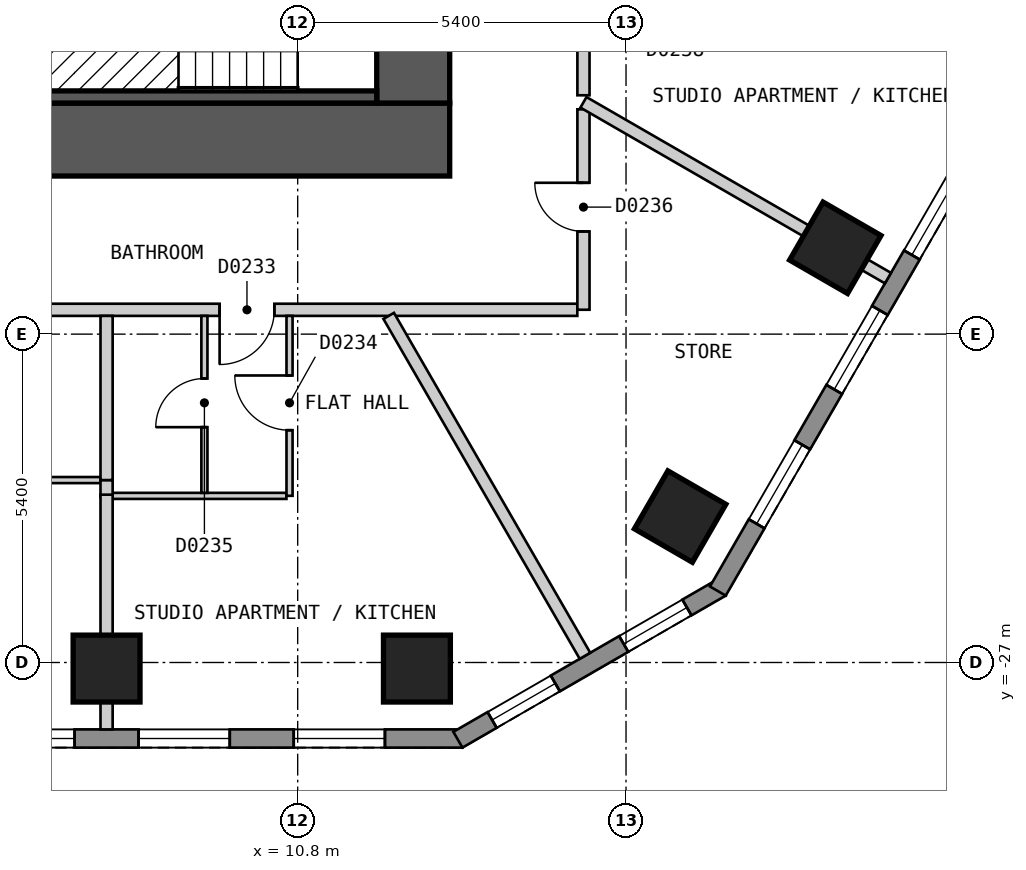
"""IFC4 building model, lengths in metres.
Left out: names, types, materials, properties, quantities, classifications, styles, units other than length and angle.
Written with IfcOpenShell. Run it as: python <this file> out.ifc"""

import sys

from ifc_helpers import new_model, si_unit, direction, frame, frame_2d, origin, origin_2d, place, context, subcontext, project, spatial, polyline, rectangle, outline, extrude, element, fill, save


model = new_model("IFC4")
c1 = context("Model", 3, precision=1e-05, world=origin(), true_north=direction((0.0, 1.0)))
c2 = subcontext(c1, "Body", "Model", "MODEL_VIEW")
j1 = project(units=[si_unit("LENGTHUNIT", "METRE"), si_unit("PLANEANGLEUNIT", "RADIAN")], contexts=[c1])
p1 = place(None, origin())
s1 = spatial("IfcSite", under=j1, at=p1, CompositionType="ELEMENT")
p2 = place(p1, origin())
s2 = spatial("IfcBuilding", under=s1, at=p2, CompositionType="ELEMENT")
p3 = place(p2, frame((0.0, 0.0, 47.4)))
s3 = spatial("IfcBuildingStorey", under=s2, at=p3, CompositionType="ELEMENT", Elevation=47.4)
for number, where, z_axis, x_axis in (
    (1, (7.657, -27.1, 0.0), (0.0, 0.0, 1.0), (1.0, 0.0, 0.0)),
    (2, (12.761, -27.1, 0.0), (0.0, 0.0, 1.0), (1.0, 0.0, 0.0)),
    (3, (17.09, -24.6, 0.0), (0.0, 0.0, 1.0), (0.5, 0.866, 0.0)),
    (4, (19.642, -20.18, 0.0), (0.0, 0.0, 1.0), (0.5, 0.866, 0.0)),
):
    element("IfcColumn", number, at=place(p3, frame(where, z_axis=z_axis, x_axis=x_axis)), inside=s3, PredefinedType="COLUMN", context=c2, shape_type="SweptSolid", body=[
        extrude(rectangle(XDim=1.1, YDim=1.1, at=origin_2d()), origin(), (0.0, 0.0, 1.0), 3.0),
    ])
p4 = place(p3, frame((-13.3, -18.4, 0.0), z_axis=(0.0, 0.0, 1.0), x_axis=(1.0, 0.0, 0.0)))
e5 = element("IfcWall", 5, at=p4, inside=s3, PredefinedType="SHEAR", context=c2, shape_type="SweptSolid", body=[
    extrude(rectangle(XDim=26.6, YDim=1.2, at=frame_2d((13.3, 0.0))), origin(), (0.0, 0.0, 1.0), 2.7),
])
p5 = place(p3, frame((12.7, -17.8, 0.0), z_axis=(0.0, 0.0, 1.0), x_axis=(0.0, 1.0, 0.0)))
e6 = element("IfcWall", 6, at=p5, inside=s3, PredefinedType="SHEAR", context=c2, shape_type="SweptSolid", body=[
    extrude(rectangle(XDim=11.6, YDim=1.2, at=frame_2d((5.8, 0.0))), origin(), (0.0, 0.0, 1.0), 2.7),
])
p6 = place(p3, frame((-13.51, -28.25, 0.0), z_axis=(0.0, 0.0, 1.0), x_axis=(1.0, 0.0, 0.0)))
e7 = element("IfcWall", 7, at=p6, inside=s3, PredefinedType="SOLIDWALL", context=c2, shape_type="SweptSolid", body=[
    extrude(outline(polyline([(0.0, -0.15), (27.02, -0.15), (26.94, 0.15), (0.08, 0.15), (0.0, -0.15)])), origin(), (0.0, 0.0, 1.0), 2.7),
])
p7 = place(p6, frame((1.277, 0.0, 0.15)))
e8 = element("IfcOpeningElement", 8, at=p7, cuts=e7, PredefinedType="OPENING", context=c2, shape_type="SweptSolid", body=[
    extrude(rectangle(XDim=1.5, YDim=2.1, at=frame_2d((0.75, 1.05))), frame((0.0, 0.16, 0.0), z_axis=(0.0, -1.0, 0.0), x_axis=(1.0, 0.0, 0.0)), (0.0, 0.0, 1.0), 0.32),
])
p8 = place(p6, frame((3.829, 0.0, 0.15)))
e9 = element("IfcOpeningElement", 9, at=p8, cuts=e7, PredefinedType="OPENING", context=c2, shape_type="SweptSolid", body=[
    extrude(rectangle(XDim=1.5, YDim=2.1, at=frame_2d((0.75, 1.05))), frame((0.0, 0.16, 0.0), z_axis=(0.0, -1.0, 0.0), x_axis=(1.0, 0.0, 0.0)), (0.0, 0.0, 1.0), 0.32),
])
p9 = place(p6, frame((6.381, 0.0, 0.15)))
e10 = element("IfcOpeningElement", 10, at=p9, cuts=e7, PredefinedType="OPENING", context=c2, shape_type="SweptSolid", body=[
    extrude(rectangle(XDim=1.5, YDim=2.1, at=frame_2d((0.75, 1.05))), frame((0.0, 0.16, 0.0), z_axis=(0.0, -1.0, 0.0), x_axis=(1.0, 0.0, 0.0)), (0.0, 0.0, 1.0), 0.32),
])
p10 = place(p6, frame((8.933, 0.0, 0.15)))
e11 = element("IfcOpeningElement", 11, at=p10, cuts=e7, PredefinedType="OPENING", context=c2, shape_type="SweptSolid", body=[
    extrude(rectangle(XDim=1.5, YDim=2.1, at=frame_2d((0.75, 1.05))), frame((0.0, 0.16, 0.0), z_axis=(0.0, -1.0, 0.0), x_axis=(1.0, 0.0, 0.0)), (0.0, 0.0, 1.0), 0.32),
])
p11 = place(p6, frame((11.485, 0.0, 0.15)))
e12 = element("IfcOpeningElement", 12, at=p11, cuts=e7, PredefinedType="OPENING", context=c2, shape_type="SweptSolid", body=[
    extrude(rectangle(XDim=1.5, YDim=2.1, at=frame_2d((0.75, 1.05))), frame((0.0, 0.16, 0.0), z_axis=(0.0, -1.0, 0.0), x_axis=(1.0, 0.0, 0.0)), (0.0, 0.0, 1.0), 0.32),
])
p12 = place(p6, frame((14.037, 0.0, 0.15)))
e13 = element("IfcOpeningElement", 13, at=p12, cuts=e7, PredefinedType="OPENING", context=c2, shape_type="SweptSolid", body=[
    extrude(rectangle(XDim=1.5, YDim=2.1, at=frame_2d((0.75, 1.05))), frame((0.0, 0.16, 0.0), z_axis=(0.0, -1.0, 0.0), x_axis=(1.0, 0.0, 0.0)), (0.0, 0.0, 1.0), 0.32),
])
p13 = place(p6, frame((16.589, 0.0, 0.15)))
e14 = element("IfcOpeningElement", 14, at=p13, cuts=e7, PredefinedType="OPENING", context=c2, shape_type="SweptSolid", body=[
    extrude(rectangle(XDim=1.5, YDim=2.1, at=frame_2d((0.75, 1.05))), frame((0.0, 0.16, 0.0), z_axis=(0.0, -1.0, 0.0), x_axis=(1.0, 0.0, 0.0)), (0.0, 0.0, 1.0), 0.32),
])
p14 = place(p6, frame((19.141, 0.0, 0.15)))
e15 = element("IfcOpeningElement", 15, at=p14, cuts=e7, PredefinedType="OPENING", context=c2, shape_type="SweptSolid", body=[
    extrude(rectangle(XDim=1.5, YDim=2.1, at=frame_2d((0.75, 1.05))), frame((0.0, 0.16, 0.0), z_axis=(0.0, -1.0, 0.0), x_axis=(1.0, 0.0, 0.0)), (0.0, 0.0, 1.0), 0.32),
])
p15 = place(p6, frame((21.693, 0.0, 0.15)))
e16 = element("IfcOpeningElement", 16, at=p15, cuts=e7, PredefinedType="OPENING", context=c2, shape_type="SweptSolid", body=[
    extrude(rectangle(XDim=1.5, YDim=2.1, at=frame_2d((0.75, 1.05))), frame((0.0, 0.16, 0.0), z_axis=(0.0, -1.0, 0.0), x_axis=(1.0, 0.0, 0.0)), (0.0, 0.0, 1.0), 0.32),
])
p16 = place(p6, frame((24.245, 0.0, 0.15)))
e17 = element("IfcOpeningElement", 17, at=p16, cuts=e7, PredefinedType="OPENING", context=c2, shape_type="SweptSolid", body=[
    extrude(rectangle(XDim=1.5, YDim=2.1, at=frame_2d((0.75, 1.05))), frame((0.0, 0.16, 0.0), z_axis=(0.0, -1.0, 0.0), x_axis=(1.0, 0.0, 0.0)), (0.0, 0.0, 1.0), 0.32),
])
p17 = place(p3, frame((13.435, -28.27, 0.0), z_axis=(0.0, 0.0, 1.0), x_axis=(0.866010750942, 0.50002537861, 0.0)))
e18 = element("IfcWall", 18, at=p17, inside=s3, PredefinedType="SOLIDWALL", context=c2, shape_type="SweptSolid", body=[
    extrude(outline(polyline([(0.0, -0.15), (5.0, -0.15), (4.919, 0.15), (0.08, 0.15), (0.0, -0.15)])), origin(), (0.0, 0.0, 1.0), 2.7),
])
p18 = place(p17, frame((0.65, 0.0, 0.15)))
e19 = element("IfcOpeningElement", 19, at=p18, cuts=e18, PredefinedType="OPENING", context=c2, shape_type="SweptSolid", body=[
    extrude(rectangle(XDim=1.2, YDim=2.1, at=frame_2d((0.6, 1.05))), frame((0.0, 0.16, 0.0), z_axis=(0.0, -1.0, 0.0), x_axis=(1.0, 0.0, 0.0)), (0.0, 0.0, 1.0), 0.32),
])
p19 = place(p17, frame((3.149, 0.0, 0.15)))
e20 = element("IfcOpeningElement", 20, at=p19, cuts=e18, PredefinedType="OPENING", context=c2, shape_type="SweptSolid", body=[
    extrude(rectangle(XDim=1.2, YDim=2.1, at=frame_2d((0.6, 1.05))), frame((0.0, 0.16, 0.0), z_axis=(0.0, -1.0, 0.0), x_axis=(1.0, 0.0, 0.0)), (0.0, 0.0, 1.0), 0.32),
])
p20 = place(p3, frame((17.71, -25.825, 0.0), z_axis=(0.0, 0.0, 1.0), x_axis=(0.500001938803, 0.866024284413, 0.0)))
e21 = element("IfcWall", 21, at=p20, inside=s3, PredefinedType="SOLIDWALL", context=c2, shape_type="SweptSolid", body=[
    extrude(outline(polyline([(0.0, -0.15), (27.02, -0.15), (26.94, 0.15), (0.08, 0.15), (0.0, -0.15)])), origin(), (0.0, 0.0, 1.0), 2.7),
])
p21 = place(p20, frame((1.277, 0.0, 0.15)))
e22 = element("IfcOpeningElement", 22, at=p21, cuts=e21, PredefinedType="OPENING", context=c2, shape_type="SweptSolid", body=[
    extrude(rectangle(XDim=1.5, YDim=2.1, at=frame_2d((0.75, 1.05))), frame((0.0, 0.16, 0.0), z_axis=(0.0, -1.0, 0.0), x_axis=(1.0, 0.0, 0.0)), (0.0, 0.0, 1.0), 0.32),
])
p22 = place(p20, frame((3.829, 0.0, 0.15)))
e23 = element("IfcOpeningElement", 23, at=p22, cuts=e21, PredefinedType="OPENING", context=c2, shape_type="SweptSolid", body=[
    extrude(rectangle(XDim=1.5, YDim=2.1, at=frame_2d((0.75, 1.05))), frame((0.0, 0.16, 0.0), z_axis=(0.0, -1.0, 0.0), x_axis=(1.0, 0.0, 0.0)), (0.0, 0.0, 1.0), 0.32),
])
p23 = place(p20, frame((6.382, 0.0, 0.15)))
e24 = element("IfcOpeningElement", 24, at=p23, cuts=e21, PredefinedType="OPENING", context=c2, shape_type="SweptSolid", body=[
    extrude(rectangle(XDim=1.5, YDim=2.1, at=frame_2d((0.75, 1.05))), frame((0.0, 0.16, 0.0), z_axis=(0.0, -1.0, 0.0), x_axis=(1.0, 0.0, 0.0)), (0.0, 0.0, 1.0), 0.32),
])
p24 = place(p20, frame((8.933, 0.0, 0.15)))
e25 = element("IfcOpeningElement", 25, at=p24, cuts=e21, PredefinedType="OPENING", context=c2, shape_type="SweptSolid", body=[
    extrude(rectangle(XDim=1.5, YDim=2.1, at=frame_2d((0.75, 1.05))), frame((0.0, 0.16, 0.0), z_axis=(0.0, -1.0, 0.0), x_axis=(1.0, 0.0, 0.0)), (0.0, 0.0, 1.0), 0.32),
])
p25 = place(p20, frame((11.485, 0.0, 0.15)))
e26 = element("IfcOpeningElement", 26, at=p25, cuts=e21, PredefinedType="OPENING", context=c2, shape_type="SweptSolid", body=[
    extrude(rectangle(XDim=1.5, YDim=2.1, at=frame_2d((0.75, 1.05))), frame((0.0, 0.16, 0.0), z_axis=(0.0, -1.0, 0.0), x_axis=(1.0, 0.0, 0.0)), (0.0, 0.0, 1.0), 0.32),
])
p26 = place(p20, frame((14.037, 0.0, 0.15)))
e27 = element("IfcOpeningElement", 27, at=p26, cuts=e21, PredefinedType="OPENING", context=c2, shape_type="SweptSolid", body=[
    extrude(rectangle(XDim=1.5, YDim=2.1, at=frame_2d((0.75, 1.05))), frame((0.0, 0.16, 0.0), z_axis=(0.0, -1.0, 0.0), x_axis=(1.0, 0.0, 0.0)), (0.0, 0.0, 1.0), 0.32),
])
p27 = place(p20, frame((16.589, 0.0, 0.15)))
e28 = element("IfcOpeningElement", 28, at=p27, cuts=e21, PredefinedType="OPENING", context=c2, shape_type="SweptSolid", body=[
    extrude(rectangle(XDim=1.5, YDim=2.1, at=frame_2d((0.75, 1.05))), frame((0.0, 0.16, 0.0), z_axis=(0.0, -1.0, 0.0), x_axis=(1.0, 0.0, 0.0)), (0.0, 0.0, 1.0), 0.32),
])
p28 = place(p20, frame((19.141, 0.0, 0.15)))
e29 = element("IfcOpeningElement", 29, at=p28, cuts=e21, PredefinedType="OPENING", context=c2, shape_type="SweptSolid", body=[
    extrude(rectangle(XDim=1.5, YDim=2.1, at=frame_2d((0.75, 1.05))), frame((0.0, 0.16, 0.0), z_axis=(0.0, -1.0, 0.0), x_axis=(1.0, 0.0, 0.0)), (0.0, 0.0, 1.0), 0.32),
])
p29 = place(p20, frame((21.693, 0.0, 0.15)))
e30 = element("IfcOpeningElement", 30, at=p29, cuts=e21, PredefinedType="OPENING", context=c2, shape_type="SweptSolid", body=[
    extrude(rectangle(XDim=1.5, YDim=2.1, at=frame_2d((0.75, 1.05))), frame((0.0, 0.16, 0.0), z_axis=(0.0, -1.0, 0.0), x_axis=(1.0, 0.0, 0.0)), (0.0, 0.0, 1.0), 0.32),
])
p30 = place(p20, frame((24.244, 0.0, 0.15)))
e31 = element("IfcOpeningElement", 31, at=p30, cuts=e21, PredefinedType="OPENING", context=c2, shape_type="SweptSolid", body=[
    extrude(rectangle(XDim=1.5, YDim=2.1, at=frame_2d((0.75, 1.05))), frame((0.0, 0.16, 0.0), z_axis=(0.0, -1.0, 0.0), x_axis=(1.0, 0.0, 0.0)), (0.0, 0.0, 1.0), 0.32),
])
p31 = place(p3, frame((15.5, -15.943, 0.0), z_axis=(0.0, 0.0, 1.0), x_axis=(0.0, -1.0, 0.0)))
e32 = element("IfcWall", 32, at=p31, inside=s3, PredefinedType="PARTITIONING", context=c2, shape_type="SweptSolid", body=[
    extrude(rectangle(XDim=1.729, YDim=0.2, at=frame_2d((0.865, 0.0))), origin(), (0.0, 0.0, 1.0), 2.7),
])
p32 = place(p3, frame((-15.499, -21.2, 0.0), z_axis=(0.0, 0.0, 1.0), x_axis=(1.0, 0.0, 0.0)))
e33 = element("IfcWall", 33, at=p32, inside=s3, PredefinedType="PARTITIONING", context=c2, shape_type="SweptSolid", body=[
    extrude(rectangle(XDim=30.898, YDim=0.2, at=frame_2d((15.449, 0.0))), origin(), (0.0, 0.0, 1.0), 2.7),
])
p33 = place(p32, frame((5.084, 0.0, 0.0)))
e34 = element("IfcOpeningElement", 34, at=p33, cuts=e33, PredefinedType="OPENING", context=c2, shape_type="SweptSolid", body=[
    extrude(rectangle(XDim=0.9, YDim=2.1, at=frame_2d((0.45, 1.05))), frame((0.0, 0.11, 0.0), z_axis=(0.0, -1.0, 0.0), x_axis=(1.0, 0.0, 0.0)), (0.0, 0.0, 1.0), 0.22),
])
p34 = place(p32, frame((15.0, 0.0, 0.0)))
e35 = element("IfcOpeningElement", 35, at=p34, cuts=e33, PredefinedType="OPENING", context=c2, shape_type="SweptSolid", body=[
    extrude(rectangle(XDim=1.0, YDim=2.1, at=frame_2d((0.5, 1.05))), frame((0.0, 0.11, 0.0), z_axis=(0.0, -1.0, 0.0), x_axis=(1.0, 0.0, 0.0)), (0.0, 0.0, 1.0), 0.22),
])
p35 = place(p32, frame((25.015, 0.0, 0.0)))
e36 = element("IfcOpeningElement", 36, at=p35, cuts=e33, PredefinedType="OPENING", context=c2, shape_type="SweptSolid", body=[
    extrude(rectangle(XDim=0.9, YDim=2.1, at=frame_2d((0.45, 1.05))), frame((0.0, 0.11, 0.0), z_axis=(0.0, -1.0, 0.0), x_axis=(1.0, 0.0, 0.0)), (0.0, 0.0, 1.0), 0.22),
])
p36 = place(p3, frame((15.5, -21.199, 0.0), z_axis=(0.0, 0.0, 1.0), x_axis=(0.0, 1.0, 0.0)))
e37 = element("IfcWall", 37, at=p36, inside=s3, PredefinedType="PARTITIONING", context=c2, shape_type="SweptSolid", body=[
    extrude(rectangle(XDim=3.296, YDim=0.2, at=frame_2d((1.648, 0.0))), origin(), (0.0, 0.0, 1.0), 2.7),
])
p37 = place(p36, frame((1.288, 0.0, 0.0)))
e38 = element("IfcOpeningElement", 38, at=p37, cuts=e37, PredefinedType="OPENING", context=c2, shape_type="SweptSolid", body=[
    extrude(rectangle(XDim=0.8, YDim=2.1, at=frame_2d((0.4, 1.05))), frame((0.0, 0.11, 0.0), z_axis=(0.0, -1.0, 0.0), x_axis=(1.0, 0.0, 0.0)), (0.0, 0.0, 1.0), 0.22),
])
p38 = place(p3, frame((2.603, -24.0, 0.0), z_axis=(0.0, 0.0, 1.0), x_axis=(1.0, 0.0, 0.0)))
e39 = element("IfcWall", 39, at=p38, inside=s3, PredefinedType="PARTITIONING", context=c2, shape_type="SweptSolid", body=[
    extrude(rectangle(XDim=4.954, YDim=0.1, at=frame_2d((2.477, 0.0))), origin(), (0.0, 0.0, 1.0), 2.7),
])
p39 = place(p38, frame((2.102, 0.0, 0.0)))
e40 = element("IfcOpeningElement", 40, at=p39, cuts=e39, PredefinedType="OPENING", context=c2, shape_type="SweptSolid", body=[
    extrude(rectangle(XDim=0.8, YDim=2.1, at=frame_2d((0.4, 1.05))), frame((0.0, 0.06, 0.0), z_axis=(0.0, -1.0, 0.0), x_axis=(1.0, 0.0, 0.0)), (0.0, 0.0, 1.0), 0.12),
])
p40 = place(p3, frame((7.757, -24.26, 0.0), z_axis=(0.0, 0.0, 1.0), x_axis=(1.0, 0.0, 0.0)))
e41 = element("IfcWall", 41, at=p40, inside=s3, PredefinedType="PARTITIONING", context=c2, shape_type="SweptSolid", body=[
    extrude(rectangle(XDim=2.858, YDim=0.1, at=frame_2d((1.429, 0.0))), origin(), (0.0, 0.0, 1.0), 2.7),
])
p41 = place(p3, frame((9.266, -24.21, 0.0), z_axis=(0.0, 0.0, 1.0), x_axis=(0.0, 1.0, 0.0)))
e42 = element("IfcWall", 42, at=p41, inside=s3, PredefinedType="PARTITIONING", context=c2, shape_type="SweptSolid", body=[
    extrude(rectangle(XDim=2.91, YDim=0.1, at=frame_2d((1.455, 0.0))), origin(), (0.0, 0.0, 1.0), 2.7),
])
p42 = place(p41, frame((1.08, 0.0, 0.0)))
e43 = element("IfcOpeningElement", 43, at=p42, cuts=e42, PredefinedType="OPENING", context=c2, shape_type="SweptSolid", body=[
    extrude(rectangle(XDim=0.8, YDim=2.1, at=frame_2d((0.4, 1.05))), frame((0.0, 0.06, 0.0), z_axis=(0.0, -1.0, 0.0), x_axis=(1.0, 0.0, 0.0)), (0.0, 0.0, 1.0), 0.12),
])
p43 = place(p3, frame((10.666, -24.259, 0.0), z_axis=(0.0, 0.0, 1.0), x_axis=(0.0, 1.0, 0.0)))
e44 = element("IfcWall", 44, at=p43, inside=s3, PredefinedType="PARTITIONING", context=c2, shape_type="SweptSolid", body=[
    extrude(rectangle(XDim=2.959, YDim=0.1, at=frame_2d((1.479, 0.0))), origin(), (0.0, 0.0, 1.0), 2.7),
])
p44 = place(p43, frame((1.079, 0.0, 0.0)))
e45 = element("IfcOpeningElement", 45, at=p44, cuts=e44, PredefinedType="OPENING", context=c2, shape_type="SweptSolid", body=[
    extrude(rectangle(XDim=0.9, YDim=2.1, at=frame_2d((0.45, 1.05))), frame((0.0, 0.06, 0.0), z_axis=(0.0, -1.0, 0.0), x_axis=(1.0, 0.0, 0.0)), (0.0, 0.0, 1.0), 0.12),
])
p45 = place(p3, frame((12.297, -21.3, 0.0), z_axis=(0.0, 0.0, 1.0), x_axis=(0.500056399578, -0.865992839024, 0.0)))
e46 = element("IfcWall", 46, at=p45, inside=s3, PredefinedType="PARTITIONING", context=c2, shape_type="SweptSolid", body=[
    extrude(rectangle(XDim=6.455, YDim=0.2, at=frame_2d((3.228, 0.0))), origin(), (0.0, 0.0, 1.0), 2.7),
])
p46 = place(p3, frame((7.657, -24.0, 0.0), z_axis=(0.0, 0.0, 1.0), x_axis=(0.0, -1.0, 0.0)))
e47 = element("IfcWall", 47, at=p46, inside=s3, PredefinedType="PARTITIONING", context=c2, shape_type="SweptSolid", body=[
    extrude(rectangle(XDim=0.28, YDim=0.2, at=frame_2d((0.14, 0.0))), origin(), (0.0, 0.0, 1.0), 2.7),
])
p47 = place(p3, frame((15.5, -17.788, 0.0), z_axis=(0.0, 0.0, 1.0), x_axis=(0.866065366639, -0.499930775916, 0.0)))
e48 = element("IfcWall", 48, at=p47, inside=s3, PredefinedType="PARTITIONING", context=c2, shape_type="SweptSolid", body=[
    extrude(rectangle(XDim=5.782, YDim=0.2, at=frame_2d((2.891, 0.0))), origin(), (0.0, 0.0, 1.0), 2.7),
])
p48 = place(p3, frame((7.657, -28.1, 0.0), z_axis=(0.0, 0.0, 1.0), x_axis=(0.0, 1.0, 0.0)))
e49 = element("IfcWall", 49, at=p48, inside=s3, PredefinedType="PARTITIONING", context=c2, shape_type="SweptSolid", body=[
    extrude(rectangle(XDim=3.86, YDim=0.2, at=frame_2d((1.93, 0.0))), origin(), (0.0, 0.0, 1.0), 2.7),
])
p49 = place(p3, frame((7.657, -24.0, 0.0), z_axis=(0.0, 0.0, 1.0), x_axis=(0.0, 1.0, 0.0)))
e50 = element("IfcWall", 50, at=p49, inside=s3, PredefinedType="PARTITIONING", context=c2, shape_type="SweptSolid", body=[
    extrude(rectangle(XDim=2.7, YDim=0.2, at=frame_2d((1.35, 0.0))), origin(), (0.0, 0.0, 1.0), 2.7),
])
p50 = place(p3, frame((6.7, -17.7, 0.0), z_axis=(0.0, 0.0, 1.0), x_axis=(1.0, 0.0, 0.0)))
e51 = element("IfcWall", 51, at=p50, inside=s3, PredefinedType="SOLIDWALL", context=c2, shape_type="SweptSolid", body=[
    extrude(rectangle(XDim=5.4, YDim=0.2, at=frame_2d((2.7, 0.0))), origin(), (0.0, 0.0, 1.0), 2.7),
])
p51 = place(p14, origin())
e52 = element("IfcWindow", 52, at=p51, inside=s3, PartitioningType="SINGLE_PANEL", PredefinedType="WINDOW", context=c2, shape_type="SweptSolid", body=[
    extrude(rectangle(XDim=1.5, YDim=2.1, at=frame_2d((0.75, 1.05))), frame((0.0, 0.03, 0.0), z_axis=(0.0, -1.0, 0.0), x_axis=(1.0, 0.0, 0.0)), (0.0, 0.0, 1.0), 0.06),
])
fill(e15, e52)
p52 = place(p15, origin())
e53 = element("IfcWindow", 53, at=p52, inside=s3, PartitioningType="SINGLE_PANEL", PredefinedType="WINDOW", context=c2, shape_type="SweptSolid", body=[
    extrude(rectangle(XDim=1.5, YDim=2.1, at=frame_2d((0.75, 1.05))), frame((0.0, 0.03, 0.0), z_axis=(0.0, -1.0, 0.0), x_axis=(1.0, 0.0, 0.0)), (0.0, 0.0, 1.0), 0.06),
])
fill(e16, e53)
p53 = place(p16, origin())
e54 = element("IfcWindow", 54, at=p53, inside=s3, PartitioningType="SINGLE_PANEL", PredefinedType="WINDOW", context=c2, shape_type="SweptSolid", body=[
    extrude(rectangle(XDim=1.5, YDim=2.1, at=frame_2d((0.75, 1.05))), frame((0.0, 0.03, 0.0), z_axis=(0.0, -1.0, 0.0), x_axis=(1.0, 0.0, 0.0)), (0.0, 0.0, 1.0), 0.06),
])
fill(e17, e54)
p54 = place(p18, origin())
e55 = element("IfcWindow", 55, at=p54, inside=s3, PartitioningType="SINGLE_PANEL", PredefinedType="WINDOW", context=c2, shape_type="SweptSolid", body=[
    extrude(rectangle(XDim=1.2, YDim=2.1, at=frame_2d((0.6, 1.05))), frame((0.0, 0.03, 0.0), z_axis=(0.0, -1.0, 0.0), x_axis=(1.0, 0.0, 0.0)), (0.0, 0.0, 1.0), 0.06),
])
fill(e19, e55)
p55 = place(p19, origin())
e56 = element("IfcWindow", 56, at=p55, inside=s3, PartitioningType="SINGLE_PANEL", PredefinedType="WINDOW", context=c2, shape_type="SweptSolid", body=[
    extrude(rectangle(XDim=1.2, YDim=2.1, at=frame_2d((0.6, 1.05))), frame((0.0, 0.03, 0.0), z_axis=(0.0, -1.0, 0.0), x_axis=(1.0, 0.0, 0.0)), (0.0, 0.0, 1.0), 0.06),
])
fill(e20, e56)
p56 = place(p21, origin())
e57 = element("IfcWindow", 57, at=p56, inside=s3, PartitioningType="SINGLE_PANEL", PredefinedType="WINDOW", context=c2, shape_type="SweptSolid", body=[
    extrude(rectangle(XDim=1.5, YDim=2.1, at=frame_2d((0.75, 1.05))), frame((0.0, 0.03, 0.0), z_axis=(0.0, -1.0, 0.0), x_axis=(1.0, 0.0, 0.0)), (0.0, 0.0, 1.0), 0.06),
])
fill(e22, e57)
p57 = place(p22, origin())
e58 = element("IfcWindow", 58, at=p57, inside=s3, PartitioningType="SINGLE_PANEL", PredefinedType="WINDOW", context=c2, shape_type="SweptSolid", body=[
    extrude(rectangle(XDim=1.5, YDim=2.1, at=frame_2d((0.75, 1.05))), frame((0.0, 0.03, 0.0), z_axis=(0.0, -1.0, 0.0), x_axis=(1.0, 0.0, 0.0)), (0.0, 0.0, 1.0), 0.06),
])
fill(e23, e58)
p58 = place(p23, origin())
e59 = element("IfcWindow", 59, at=p58, inside=s3, PartitioningType="SINGLE_PANEL", PredefinedType="WINDOW", context=c2, shape_type="SweptSolid", body=[
    extrude(rectangle(XDim=1.5, YDim=2.1, at=frame_2d((0.75, 1.05))), frame((0.0, 0.03, 0.0), z_axis=(0.0, -1.0, 0.0), x_axis=(1.0, 0.0, 0.0)), (0.0, 0.0, 1.0), 0.06),
])
fill(e24, e59)
p59 = place(p35, origin())
e60 = element("IfcDoor", 60, at=p59, inside=s3, OperationType="SINGLE_SWING_LEFT", PredefinedType="DOOR", context=c2, shape_type="SweptSolid", body=[
    extrude(rectangle(XDim=0.9, YDim=2.1, at=frame_2d((0.45, 1.05))), frame((0.0, 0.025, 0.0), z_axis=(0.0, -1.0, 0.0), x_axis=(1.0, 0.0, 0.0)), (0.0, 0.0, 1.0), 0.05),
])
fill(e36, e60)
p60 = place(p44, origin())
e61 = element("IfcDoor", 61, at=p60, inside=s3, OperationType="SINGLE_SWING_RIGHT", PredefinedType="DOOR", context=c2, shape_type="SweptSolid", body=[
    extrude(rectangle(XDim=0.9, YDim=2.1, at=frame_2d((0.45, 1.05))), frame((0.0, 0.025, 0.0), z_axis=(0.0, -1.0, 0.0), x_axis=(1.0, 0.0, 0.0)), (0.0, 0.0, 1.0), 0.05),
])
fill(e45, e61)
p61 = place(p42, origin())
e62 = element("IfcDoor", 62, at=p61, inside=s3, OperationType="SINGLE_SWING_LEFT", PredefinedType="DOOR", context=c2, shape_type="SweptSolid", body=[
    extrude(rectangle(XDim=0.8, YDim=2.1, at=frame_2d((0.4, 1.05))), frame((0.0, 0.025, 0.0), z_axis=(0.0, -1.0, 0.0), x_axis=(1.0, 0.0, 0.0)), (0.0, 0.0, 1.0), 0.05),
])
fill(e43, e62)
p62 = place(p37, origin())
e63 = element("IfcDoor", 63, at=p62, inside=s3, OperationType="SINGLE_SWING_RIGHT", PredefinedType="DOOR", context=c2, shape_type="SweptSolid", body=[
    extrude(rectangle(XDim=0.8, YDim=2.1, at=frame_2d((0.4, 1.05))), frame((0.0, 0.025, 0.0), z_axis=(0.0, -1.0, 0.0), x_axis=(1.0, 0.0, 0.0)), (0.0, 0.0, 1.0), 0.05),
])
fill(e38, e63)
save(model, sys.argv[1])
